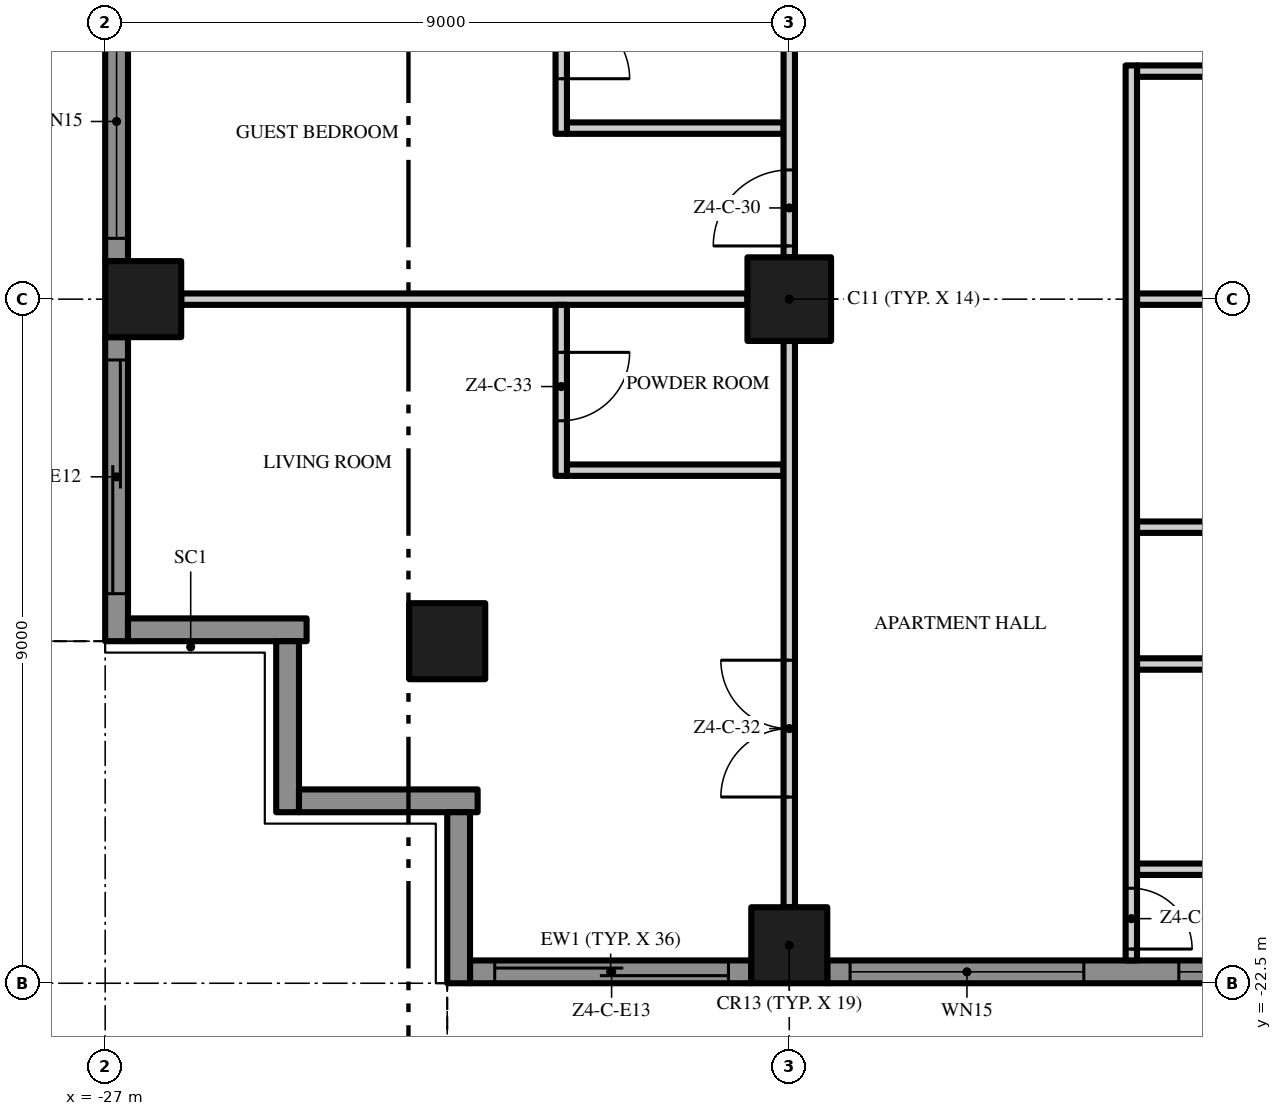
"""IFC4 building model, lengths in metres.
Left out: names, types, materials, properties, quantities, classifications, styles, units other than length and angle.
Written with IfcOpenShell. Run it as: python <this file> out.ifc"""

import sys

from ifc_helpers import new_model, si_unit, direction, frame, frame_2d, origin, origin_2d, place, context, subcontext, project, spatial, polyline, rectangle, outline, extrude, element, fill, save


model = new_model("IFC4")
c1 = context("Model", 3, precision=1e-05, world=origin(), true_north=direction((0.0, 1.0)))
c2 = subcontext(c1, "Body", "Model", "MODEL_VIEW")
j1 = project(units=[si_unit("LENGTHUNIT", "METRE"), si_unit("PLANEANGLEUNIT", "RADIAN")], contexts=[c1])
p1 = place(None, origin())
s1 = spatial("IfcSite", under=j1, at=p1, CompositionType="ELEMENT")
p2 = place(p1, origin())
s2 = spatial("IfcBuilding", under=s1, at=p2, CompositionType="ELEMENT")
p3 = place(p2, frame((0.0, 0.0, 211.0)))
s3 = spatial("IfcBuildingStorey", under=s2, at=p3, CompositionType="ELEMENT", Elevation=211.0)
p4 = place(p3, frame((-18.0, -13.5, 0.0), z_axis=(0.0, 0.0, 1.0), x_axis=(1.0, 0.0, 0.0)))
e1 = element("IfcColumn", 1, at=p4, inside=s3, PredefinedType="COLUMN", context=c2, shape_type="SweptSolid", body=[
    extrude(rectangle(XDim=1.1, YDim=1.1, at=origin_2d()), origin(), (0.0, 0.0, 1.0), 3.5),
])
for number, where, z_axis, x_axis in (
    (2, (-18.0, -22.0, 0.0), (0.0, 0.0, 1.0), (1.0, 0.0, 0.0)),
    (3, (-26.5, -13.5, 0.0), (0.0, 0.0, 1.0), (1.0, 0.0, 0.0)),
    (4, (-22.5, -18.0, 0.0), (0.0, 0.0, 1.0), (1.0, 0.0, 0.0)),
):
    element("IfcColumn", number, at=place(p3, frame(where, z_axis=z_axis, x_axis=x_axis)), inside=s3, PredefinedType="COLUMN", context=c2, shape_type="SweptSolid", body=[
        extrude(rectangle(XDim=1.0, YDim=1.0, at=origin_2d()), origin(), (0.0, 0.0, 1.0), 3.5),
    ])
p5 = place(p3, frame((-18.5, -22.35, 0.0), z_axis=(0.0, 0.0, 1.0), x_axis=(-1.0, 0.0, 0.0)))
e5 = element("IfcWall", 5, at=p5, inside=s3, PredefinedType="SOLIDWALL", context=c2, shape_type="SweptSolid", body=[
    extrude(rectangle(XDim=3.7, YDim=0.3, at=frame_2d((1.85, 0.0))), origin(), (0.0, 0.0, 1.0), 3.5),
])
p6 = place(p5, frame((0.3, 0.0, 0.0)))
e6 = element("IfcOpeningElement", 6, at=p6, cuts=e5, PredefinedType="OPENING", context=c2, shape_type="SweptSolid", body=[
    extrude(rectangle(XDim=3.075, YDim=2.4, at=frame_2d((1.538, 1.2))), frame((0.0, 0.16, 0.0), z_axis=(0.0, -1.0, 0.0), x_axis=(1.0, 0.0, 0.0)), (0.0, 0.0, 1.0), 0.32),
])
p7 = place(p3, frame((-9.5, -22.35, 0.0), z_axis=(0.0, 0.0, 1.0), x_axis=(-1.0, 0.0, 0.0)))
e7 = element("IfcWall", 7, at=p7, inside=s3, PredefinedType="SOLIDWALL", context=c2, shape_type="SweptSolid", body=[
    extrude(rectangle(XDim=8.0, YDim=0.3, at=frame_2d((4.0, 0.0))), origin(), (0.0, 0.0, 1.0), 3.5),
])
p8 = place(p7, frame((4.625, 0.0, 0.45)))
e8 = element("IfcOpeningElement", 8, at=p8, cuts=e7, PredefinedType="OPENING", context=c2, shape_type="SweptSolid", body=[
    extrude(rectangle(XDim=3.075, YDim=2.65, at=frame_2d((1.538, 1.325))), frame((0.0, 0.16, 0.0), z_axis=(0.0, -1.0, 0.0), x_axis=(1.0, 0.0, 0.0)), (0.0, 0.0, 1.0), 0.32),
])
p9 = place(p7, frame((0.3, 0.0, 0.45)))
e9 = element("IfcOpeningElement", 9, at=p9, cuts=e7, PredefinedType="OPENING", context=c2, shape_type="SweptSolid", body=[
    extrude(rectangle(XDim=3.075, YDim=2.65, at=frame_2d((1.538, 1.325))), frame((0.0, 0.16, 0.0), z_axis=(0.0, -1.0, 0.0), x_axis=(1.0, 0.0, 0.0)), (0.0, 0.0, 1.0), 0.32),
])
p10 = place(p3, frame((-26.85, -13.0, 0.0), z_axis=(0.0, 0.0, 1.0), x_axis=(0.0, 1.0, 0.0)))
e10 = element("IfcWall", 10, at=p10, inside=s3, PredefinedType="SOLIDWALL", context=c2, shape_type="SweptSolid", body=[
    extrude(rectangle(XDim=8.0, YDim=0.3, at=frame_2d((4.0, 0.0))), origin(), (0.0, 0.0, 1.0), 3.5),
])
p11 = place(p10, frame((4.625, 0.0, 0.45)))
e11 = element("IfcOpeningElement", 11, at=p11, cuts=e10, PredefinedType="OPENING", context=c2, shape_type="SweptSolid", body=[
    extrude(rectangle(XDim=3.075, YDim=2.65, at=frame_2d((1.538, 1.325))), frame((0.0, 0.16, 0.0), z_axis=(0.0, -1.0, 0.0), x_axis=(1.0, 0.0, 0.0)), (0.0, 0.0, 1.0), 0.32),
])
p12 = place(p10, frame((0.3, 0.0, 0.45)))
e12 = element("IfcOpeningElement", 12, at=p12, cuts=e10, PredefinedType="OPENING", context=c2, shape_type="SweptSolid", body=[
    extrude(rectangle(XDim=3.075, YDim=2.65, at=frame_2d((1.538, 1.325))), frame((0.0, 0.16, 0.0), z_axis=(0.0, -1.0, 0.0), x_axis=(1.0, 0.0, 0.0)), (0.0, 0.0, 1.0), 0.32),
])
p13 = place(p3, frame((-26.85, -18.0, 0.0), z_axis=(0.0, 0.0, 1.0), x_axis=(0.0, 1.0, 0.0)))
e13 = element("IfcWall", 13, at=p13, inside=s3, PredefinedType="SOLIDWALL", context=c2, shape_type="SweptSolid", body=[
    extrude(rectangle(XDim=4.0, YDim=0.3, at=frame_2d((2.0, 0.0))), origin(), (0.0, 0.0, 1.0), 3.5),
])
p14 = place(p13, frame((0.625, 0.0, 0.0)))
e14 = element("IfcOpeningElement", 14, at=p14, cuts=e13, PredefinedType="OPENING", context=c2, shape_type="SweptSolid", body=[
    extrude(rectangle(XDim=3.075, YDim=2.4, at=frame_2d((1.538, 1.2))), frame((0.0, 0.16, 0.0), z_axis=(0.0, -1.0, 0.0), x_axis=(1.0, 0.0, 0.0)), (0.0, 0.0, 1.0), 0.32),
])
p15 = place(p3, frame((-24.35, -17.85, 0.0), z_axis=(0.0, 0.0, 1.0), x_axis=(-1.0, 0.0, 0.0)))
e15 = element("IfcWall", 15, at=p15, inside=s3, PredefinedType="SOLIDWALL", context=c2, shape_type="SweptSolid", body=[
    extrude(rectangle(XDim=2.35, YDim=0.3, at=frame_2d((1.175, 0.0))), origin(), (0.0, 0.0, 1.0), 3.5),
])
p16 = place(p3, frame((-24.6, -20.25, 0.0), z_axis=(0.0, 0.0, 1.0), x_axis=(0.0, 1.0, 0.0)))
e16 = element("IfcWall", 16, at=p16, inside=s3, PredefinedType="SOLIDWALL", context=c2, shape_type="SweptSolid", body=[
    extrude(rectangle(XDim=2.25, YDim=0.3, at=frame_2d((1.125, 0.0))), origin(), (0.0, 0.0, 1.0), 3.5),
])
p17 = place(p3, frame((-22.1, -20.1, 0.0), z_axis=(0.0, 0.0, 1.0), x_axis=(-1.0, 0.0, 0.0)))
e17 = element("IfcWall", 17, at=p17, inside=s3, PredefinedType="SOLIDWALL", context=c2, shape_type="SweptSolid", body=[
    extrude(rectangle(XDim=2.35, YDim=0.3, at=frame_2d((1.175, 0.0))), origin(), (0.0, 0.0, 1.0), 3.5),
])
p18 = place(p3, frame((-22.35, -22.5, 0.0), z_axis=(0.0, 0.0, 1.0), x_axis=(0.0, 1.0, 0.0)))
e18 = element("IfcWall", 18, at=p18, inside=s3, PredefinedType="SOLIDWALL", context=c2, shape_type="SweptSolid", body=[
    extrude(rectangle(XDim=2.25, YDim=0.3, at=frame_2d((1.125, 0.0))), origin(), (0.0, 0.0, 1.0), 3.5),
])
p19 = place(p3, origin())
e19 = element("IfcWall", 19, at=p19, inside=s3, PredefinedType="USERDEFINED", context=c2, shape_type="SweptSolid", body=[
    extrude(outline(polyline([(-22.5, -24.3), (-21.0, -25.005), (-19.5, -25.441), (-18.75, -25.5), (-18.0, -25.441), (-16.5, -25.005), (-15.0, -24.3), (-13.5, -23.595), (-12.0, -23.159), (-11.25, -23.1), (-10.5, -23.159), (-9.0, -23.595), (-7.5, -24.3), (-6.0, -25.005), (-4.5, -25.441), (-3.75, -25.5), (-3.0, -25.441), (-1.5, -25.005), (0.0, -24.3), (1.5, -23.595), (3.0, -23.159), (3.75, -23.1), (4.5, -23.159), (6.0, -23.595), (7.5, -24.3), (9.0, -25.005), (10.5, -25.441), (11.25, -25.5), (12.0, -25.441), (13.5, -25.005), (15.0, -24.3), (16.5, -23.595), (18.0, -23.159), (18.75, -23.1), (19.5, -23.159), (21.0, -23.595), (22.5, -24.3), (22.606, -24.074), (21.089, -23.36), (19.545, -22.911), (18.75, -22.849), (17.955, -22.911), (16.411, -23.36), (14.894, -24.074), (13.411, -24.771), (11.955, -25.194), (11.25, -25.249), (10.545, -25.194), (9.089, -24.771), (7.606, -24.074), (6.089, -23.36), (4.545, -22.911), (3.75, -22.849), (2.955, -22.911), (1.411, -23.36), (-0.106, -24.074), (-1.589, -24.771), (-3.045, -25.194), (-3.75, -25.249), (-4.455, -25.194), (-5.911, -24.771), (-7.394, -24.074), (-8.911, -23.36), (-10.455, -22.911), (-11.25, -22.849), (-12.045, -22.911), (-13.589, -23.36), (-15.106, -24.074), (-16.589, -24.771), (-18.045, -25.194), (-18.75, -25.249), (-19.455, -25.194), (-20.911, -24.771), (-22.394, -24.074), (-22.5, -24.3)])), origin(), (0.0, 0.0, 1.0), 0.9),
])
p20 = place(p3, origin())
e20 = element("IfcWall", 20, at=p20, inside=s3, PredefinedType="USERDEFINED", context=c2, shape_type="SweptSolid", body=[
    extrude(outline(polyline([(-28.8, 18.0), (-29.505, 16.5), (-29.941, 15.0), (-30.0, 14.25), (-29.941, 13.5), (-29.505, 12.0), (-28.8, 10.5), (-28.095, 9.0), (-27.659, 7.5), (-27.6, 6.75), (-27.659, 6.0), (-28.095, 4.5), (-28.8, 3.0), (-29.505, 1.5), (-29.941, 0.0), (-30.0, -0.75), (-29.941, -1.5), (-29.505, -3.0), (-28.8, -4.5), (-28.095, -6.0), (-27.659, -7.5), (-27.6, -8.25), (-27.659, -9.0), (-28.095, -10.5), (-28.8, -12.0), (-29.505, -13.5), (-29.941, -15.0), (-30.0, -15.75), (-29.941, -16.5), (-29.505, -18.0), (-29.265, -17.93), (-29.694, -16.455), (-29.749, -15.75), (-29.694, -15.045), (-29.271, -13.589), (-28.574, -12.106), (-27.86, -10.589), (-27.411, -9.045), (-27.349, -8.25), (-27.411, -7.455), (-27.86, -5.911), (-28.574, -4.394), (-29.271, -2.911), (-29.694, -1.455), (-29.749, -0.75), (-29.694, -0.045), (-29.271, 1.411), (-28.574, 2.894), (-27.86, 4.411), (-27.411, 5.955), (-27.349, 6.75), (-27.411, 7.545), (-27.86, 9.089), (-28.574, 10.606), (-29.271, 12.089), (-29.694, 13.545), (-29.749, 14.25), (-29.694, 14.955), (-29.271, 16.411), (-28.574, 17.894), (-28.8, 18.0)])), origin(), (0.0, 0.0, 1.0), 0.9),
])
for number, where, z_axis, x_axis in (
    (21, (-13.425, -21.0, 0.0), (0.0, 0.0, 1.0), (1.0, 0.0, 0.0)),
    (22, (-13.425, -18.3, 0.0), (0.0, 0.0, 1.0), (1.0, 0.0, 0.0)),
    (23, (-13.425, -16.5, 0.0), (0.0, 0.0, 1.0), (1.0, 0.0, 0.0)),
):
    element("IfcWall", number, at=place(p3, frame(where, z_axis=z_axis, x_axis=x_axis)), inside=s3, PredefinedType="PARTITIONING", context=c2, shape_type="SweptSolid", body=[
        extrude(rectangle(XDim=4.35, YDim=0.15, at=frame_2d((2.175, 0.0))), origin(), (0.0, 0.0, 1.0), 3.5),
    ])
p21 = place(p3, frame((-20.925, -15.75, 0.0), z_axis=(0.0, 0.0, 1.0), x_axis=(1.0, 0.0, 0.0)))
e24 = element("IfcWall", 24, at=p21, inside=s3, PredefinedType="PARTITIONING", context=c2, shape_type="SweptSolid", body=[
    extrude(rectangle(XDim=2.85, YDim=0.15, at=frame_2d((1.425, 0.0))), origin(), (0.0, 0.0, 1.0), 3.5),
])
p22 = place(p3, frame((-26.0, -13.5, 0.0), z_axis=(0.0, 0.0, 1.0), x_axis=(1.0, 0.0, 0.0)))
e25 = element("IfcWall", 25, at=p22, inside=s3, PredefinedType="PARTITIONING", context=c2, shape_type="SweptSolid", body=[
    extrude(rectangle(XDim=7.45, YDim=0.15, at=frame_2d((3.725, 0.0))), origin(), (0.0, 0.0, 1.0), 3.5),
])
p23 = place(p3, frame((-13.425, -13.5, 0.0), z_axis=(0.0, 0.0, 1.0), x_axis=(1.0, 0.0, 0.0)))
e26 = element("IfcWall", 26, at=p23, inside=s3, PredefinedType="PARTITIONING", context=c2, shape_type="SweptSolid", body=[
    extrude(rectangle(XDim=3.875, YDim=0.15, at=frame_2d((1.938, 0.0))), origin(), (0.0, 0.0, 1.0), 3.5),
])
p24 = place(p3, frame((-20.925, -11.25, 0.0), z_axis=(0.0, 0.0, 1.0), x_axis=(1.0, 0.0, 0.0)))
e27 = element("IfcWall", 27, at=p24, inside=s3, PredefinedType="PARTITIONING", context=c2, shape_type="SweptSolid", body=[
    extrude(rectangle(XDim=2.85, YDim=0.15, at=frame_2d((1.425, 0.0))), origin(), (0.0, 0.0, 1.0), 3.5),
])
p25 = place(p3, frame((-13.425, -10.5, 0.0), z_axis=(0.0, 0.0, 1.0), x_axis=(1.0, 0.0, 0.0)))
e28 = element("IfcWall", 28, at=p25, inside=s3, PredefinedType="PARTITIONING", context=c2, shape_type="SweptSolid", body=[
    extrude(rectangle(XDim=4.35, YDim=0.15, at=frame_2d((2.175, 0.0))), origin(), (0.0, 0.0, 1.0), 3.5),
])
p26 = place(p3, frame((-21.0, -13.575, 0.0), z_axis=(0.0, 0.0, 1.0), x_axis=(0.0, -1.0, 0.0)))
e29 = element("IfcWall", 29, at=p26, inside=s3, PredefinedType="PARTITIONING", context=c2, shape_type="SweptSolid", body=[
    extrude(rectangle(XDim=2.25, YDim=0.15, at=frame_2d((1.125, 0.0))), origin(), (0.0, 0.0, 1.0), 3.5),
])
p27 = place(p26, frame((0.625, 0.0, 0.0)))
e30 = element("IfcOpeningElement", 30, at=p27, cuts=e29, PredefinedType="OPENING", context=c2, shape_type="SweptSolid", body=[
    extrude(rectangle(XDim=0.9, YDim=2.1, at=frame_2d((0.45, 1.05))), frame((0.0, 0.085, 0.0), z_axis=(0.0, -1.0, 0.0), x_axis=(1.0, 0.0, 0.0)), (0.0, 0.0, 1.0), 0.17),
])
p28 = place(p3, frame((-21.0, -6.675, 0.0), z_axis=(0.0, 0.0, 1.0), x_axis=(0.0, -1.0, 0.0)))
e31 = element("IfcWall", 31, at=p28, inside=s3, PredefinedType="PARTITIONING", context=c2, shape_type="SweptSolid", body=[
    extrude(rectangle(XDim=4.65, YDim=0.15, at=frame_2d((2.325, 0.0))), origin(), (0.0, 0.0, 1.0), 3.5),
])
p29 = place(p28, frame((0.725, 0.0, 0.0)))
e32 = element("IfcOpeningElement", 32, at=p29, cuts=e31, PredefinedType="OPENING", context=c2, shape_type="SweptSolid", body=[
    extrude(rectangle(XDim=0.9, YDim=2.1, at=frame_2d((0.45, 1.05))), frame((0.0, 0.085, 0.0), z_axis=(0.0, -1.0, 0.0), x_axis=(1.0, 0.0, 0.0)), (0.0, 0.0, 1.0), 0.17),
])
p30 = place(p28, frame((3.025, 0.0, 0.0)))
e33 = element("IfcOpeningElement", 33, at=p30, cuts=e31, PredefinedType="OPENING", context=c2, shape_type="SweptSolid", body=[
    extrude(rectangle(XDim=0.9, YDim=2.1, at=frame_2d((0.45, 1.05))), frame((0.0, 0.085, 0.0), z_axis=(0.0, -1.0, 0.0), x_axis=(1.0, 0.0, 0.0)), (0.0, 0.0, 1.0), 0.17),
])
p31 = place(p3, frame((-18.0, -21.5, 0.0), z_axis=(0.0, 0.0, 1.0), x_axis=(0.0, 1.0, 0.0)))
e34 = element("IfcWall", 34, at=p31, inside=s3, PredefinedType="PARTITIONING", context=c2, shape_type="SweptSolid", body=[
    extrude(rectangle(XDim=7.45, YDim=0.15, at=frame_2d((3.725, 0.0))), origin(), (0.0, 0.0, 1.0), 3.5),
])
p32 = place(p31, frame((1.45, 0.0, 0.0)))
e35 = element("IfcOpeningElement", 35, at=p32, cuts=e34, PredefinedType="OPENING", context=c2, shape_type="SweptSolid", body=[
    extrude(rectangle(XDim=1.8, YDim=2.4, at=frame_2d((0.9, 1.2))), frame((0.0, 0.085, 0.0), z_axis=(0.0, -1.0, 0.0), x_axis=(1.0, 0.0, 0.0)), (0.0, 0.0, 1.0), 0.17),
])
p33 = place(p3, frame((-18.0, -12.95, 0.0), z_axis=(0.0, 0.0, 1.0), x_axis=(0.0, 1.0, 0.0)))
e36 = element("IfcWall", 36, at=p33, inside=s3, PredefinedType="PARTITIONING", context=c2, shape_type="SweptSolid", body=[
    extrude(rectangle(XDim=7.9, YDim=0.15, at=frame_2d((3.95, 0.0))), origin(), (0.0, 0.0, 1.0), 3.5),
])
p34 = place(p33, frame((6.75, 0.0, 0.0)))
e37 = element("IfcOpeningElement", 37, at=p34, cuts=e36, PredefinedType="OPENING", context=c2, shape_type="SweptSolid", body=[
    extrude(rectangle(XDim=1.0, YDim=2.4, at=frame_2d((0.5, 1.2))), frame((0.0, 0.085, 0.0), z_axis=(0.0, -1.0, 0.0), x_axis=(1.0, 0.0, 0.0)), (0.0, 0.0, 1.0), 0.17),
])
p35 = place(p33, frame((0.15, 0.0, 0.0)))
e38 = element("IfcOpeningElement", 38, at=p35, cuts=e36, PredefinedType="OPENING", context=c2, shape_type="SweptSolid", body=[
    extrude(rectangle(XDim=1.0, YDim=2.4, at=frame_2d((0.5, 1.2))), frame((0.0, 0.085, 0.0), z_axis=(0.0, -1.0, 0.0), x_axis=(1.0, 0.0, 0.0)), (0.0, 0.0, 1.0), 0.17),
])
p36 = place(p3, frame((-13.5, -10.425, 0.0), z_axis=(0.0, 0.0, 1.0), x_axis=(0.0, -1.0, 0.0)))
e39 = element("IfcWall", 39, at=p36, inside=s3, PredefinedType="PARTITIONING", context=c2, shape_type="SweptSolid", body=[
    extrude(rectangle(XDim=11.775, YDim=0.15, at=frame_2d((5.888, 0.0))), origin(), (0.0, 0.0, 1.0), 3.5),
])
p37 = place(p36, frame((10.825, 0.0, 0.0)))
e40 = element("IfcOpeningElement", 40, at=p37, cuts=e39, PredefinedType="OPENING", context=c2, shape_type="SweptSolid", body=[
    extrude(rectangle(XDim=0.8, YDim=2.0, at=frame_2d((0.4, 1.0))), frame((0.0, 0.085, 0.0), z_axis=(0.0, -1.0, 0.0), x_axis=(1.0, 0.0, 0.0)), (0.0, 0.0, 1.0), 0.17),
])
p38 = place(p6, origin())
e41 = element("IfcDoor", 41, at=p38, inside=s3, OperationType="SINGLE_SWING_LEFT", PredefinedType="DOOR", context=c2, shape_type="SweptSolid", body=[
    extrude(rectangle(XDim=3.075, YDim=2.4, at=frame_2d((1.538, 1.2))), frame((0.0, 0.025, 0.0), z_axis=(0.0, -1.0, 0.0), x_axis=(1.0, 0.0, 0.0)), (0.0, 0.0, 1.0), 0.05),
])
fill(e6, e41)
p39 = place(p8, origin())
e42 = element("IfcWindow", 42, at=p39, inside=s3, PartitioningType="SINGLE_PANEL", PredefinedType="WINDOW", context=c2, shape_type="SweptSolid", body=[
    extrude(rectangle(XDim=3.075, YDim=2.65, at=frame_2d((1.538, 1.325))), frame((0.0, 0.03, 0.0), z_axis=(0.0, -1.0, 0.0), x_axis=(1.0, 0.0, 0.0)), (0.0, 0.0, 1.0), 0.06),
])
fill(e8, e42)
p40 = place(p9, origin())
e43 = element("IfcWindow", 43, at=p40, inside=s3, PartitioningType="SINGLE_PANEL", PredefinedType="WINDOW", context=c2, shape_type="SweptSolid", body=[
    extrude(rectangle(XDim=3.075, YDim=2.65, at=frame_2d((1.538, 1.325))), frame((0.0, 0.03, 0.0), z_axis=(0.0, -1.0, 0.0), x_axis=(1.0, 0.0, 0.0)), (0.0, 0.0, 1.0), 0.06),
])
fill(e9, e43)
p41 = place(p12, origin())
e44 = element("IfcWindow", 44, at=p41, inside=s3, PartitioningType="SINGLE_PANEL", PredefinedType="WINDOW", context=c2, shape_type="SweptSolid", body=[
    extrude(rectangle(XDim=3.075, YDim=2.65, at=frame_2d((1.538, 1.325))), frame((0.0, 0.03, 0.0), z_axis=(0.0, -1.0, 0.0), x_axis=(1.0, 0.0, 0.0)), (0.0, 0.0, 1.0), 0.06),
])
fill(e12, e44)
p42 = place(p14, origin())
e45 = element("IfcDoor", 45, at=p42, inside=s3, OperationType="SINGLE_SWING_LEFT", PredefinedType="DOOR", context=c2, shape_type="SweptSolid", body=[
    extrude(rectangle(XDim=3.075, YDim=2.4, at=frame_2d((1.538, 1.2))), frame((0.0, 0.025, 0.0), z_axis=(0.0, -1.0, 0.0), x_axis=(1.0, 0.0, 0.0)), (0.0, 0.0, 1.0), 0.05),
])
fill(e14, e45)
p43 = place(p37, origin())
e46 = element("IfcDoor", 46, at=p43, inside=s3, OperationType="SINGLE_SWING_RIGHT", PredefinedType="DOOR", context=c2, shape_type="SweptSolid", body=[
    extrude(rectangle(XDim=0.8, YDim=2.0, at=frame_2d((0.4, 1.0))), frame((0.0, 0.025, 0.0), z_axis=(0.0, -1.0, 0.0), x_axis=(1.0, 0.0, 0.0)), (0.0, 0.0, 1.0), 0.05),
])
fill(e40, e46)
p44 = place(p35, origin())
e47 = element("IfcDoor", 47, at=p44, inside=s3, OperationType="SINGLE_SWING_LEFT", PredefinedType="DOOR", context=c2, shape_type="SweptSolid", body=[
    extrude(rectangle(XDim=1.0, YDim=2.4, at=frame_2d((0.5, 1.2))), frame((0.0, 0.025, 0.0), z_axis=(0.0, -1.0, 0.0), x_axis=(1.0, 0.0, 0.0)), (0.0, 0.0, 1.0), 0.05),
])
fill(e38, e47)
p45 = place(p30, origin())
e48 = element("IfcDoor", 48, at=p45, inside=s3, OperationType="SINGLE_SWING_RIGHT", PredefinedType="DOOR", context=c2, shape_type="SweptSolid", body=[
    extrude(rectangle(XDim=0.9, YDim=2.1, at=frame_2d((0.45, 1.05))), frame((0.0, 0.025, 0.0), z_axis=(0.0, -1.0, 0.0), x_axis=(1.0, 0.0, 0.0)), (0.0, 0.0, 1.0), 0.05),
])
fill(e33, e48)
p46 = place(p32, origin())
e49 = element("IfcDoor", 49, at=p46, inside=s3, OperationType="DOUBLE_DOOR_SINGLE_SWING", PredefinedType="DOOR", context=c2, shape_type="SweptSolid", body=[
    extrude(rectangle(XDim=1.8, YDim=2.4, at=frame_2d((0.9, 1.2))), frame((0.0, 0.025, 0.0), z_axis=(0.0, -1.0, 0.0), x_axis=(1.0, 0.0, 0.0)), (0.0, 0.0, 1.0), 0.05),
])
fill(e35, e49)
p47 = place(p27, origin())
e50 = element("IfcDoor", 50, at=p47, inside=s3, OperationType="SINGLE_SWING_LEFT", PredefinedType="DOOR", context=c2, shape_type="SweptSolid", body=[
    extrude(rectangle(XDim=0.9, YDim=2.1, at=frame_2d((0.45, 1.05))), frame((0.0, 0.025, 0.0), z_axis=(0.0, -1.0, 0.0), x_axis=(1.0, 0.0, 0.0)), (0.0, 0.0, 1.0), 0.05),
])
fill(e30, e50)
save(model, sys.argv[1])
